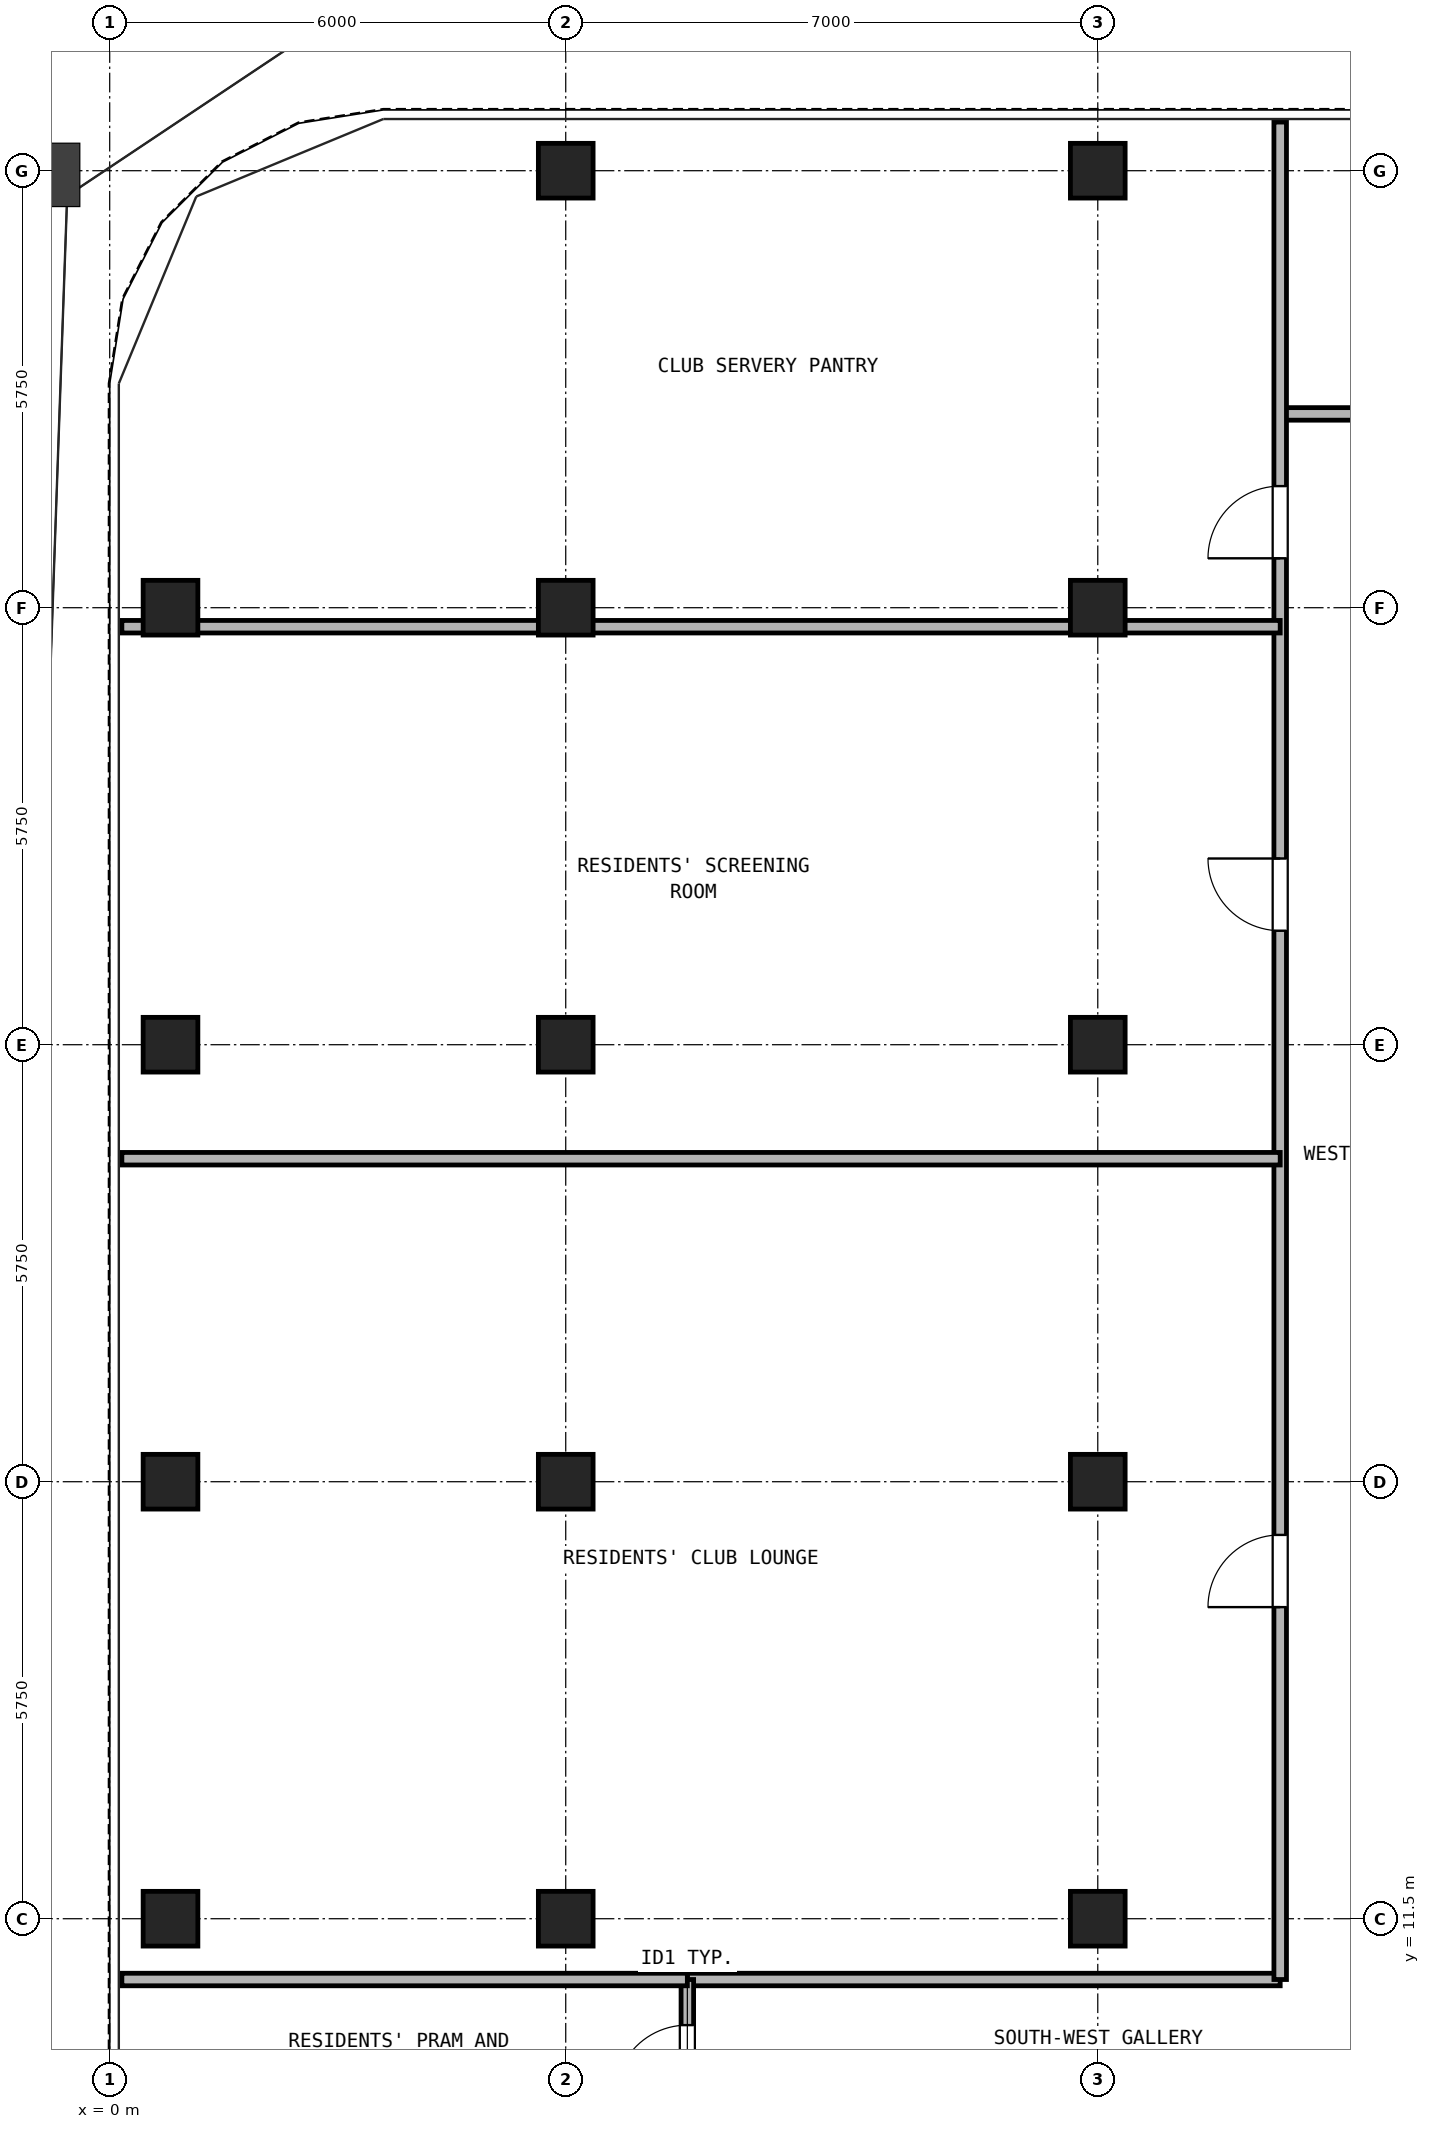
"""IFC4 building model, lengths in metres.
Left out: names, types, materials, properties, quantities, classifications, styles, units other than length and angle.
Written with IfcOpenShell. Run it as: python <this file> out.ifc"""

import sys

from ifc_helpers import new_model, si_unit, direction, frame, frame_2d, origin, origin_2d, place, context, subcontext, project, spatial, rectangle, hollow_rectangle, extrude, source, transform, mapped, element, fill, save


model = new_model("IFC4")
c1 = context("Model", 3, precision=1e-05, world=origin(), true_north=direction((0.0, 1.0)))
c2 = subcontext(c1, "Body", "Model", "MODEL_VIEW")
j1 = project(units=[si_unit("LENGTHUNIT", "METRE"), si_unit("PLANEANGLEUNIT", "RADIAN")], contexts=[c1])
p1 = place(None, origin())
s1 = spatial("IfcSite", under=j1, at=p1, CompositionType="ELEMENT")
p2 = place(p1, origin())
s2 = spatial("IfcBuilding", under=s1, at=p2, CompositionType="ELEMENT")
p3 = place(p2, frame((0.0, 0.0, 178.5)))
s3 = spatial("IfcBuildingStorey", under=s2, at=p3, CompositionType="ELEMENT", Elevation=178.5)
m1 = source(origin(), c2, "Body", "SweptSolid", [
    extrude(hollow_rectangle(XDim=0.72, YDim=0.72, WallThickness=0.04, at=origin_2d()), origin(), (0.0, 0.0, 1.0), 2.95),
])
for number, where, z_axis, x_axis in (
    (1, (6.0, 34.5, 0.0), (0.0, 0.0, 1.0), (1.0, 0.0, 0.0)),
    (2, (13.0, 34.5, 0.0), (0.0, 0.0, 1.0), (1.0, 0.0, 0.0)),
    (3, (0.8, 11.5, 0.0), (0.0, 0.0, 1.0), (1.0, 0.0, 0.0)),
    (4, (0.8, 17.25, 0.0), (0.0, 0.0, 1.0), (1.0, 0.0, 0.0)),
    (5, (0.8, 23.0, 0.0), (0.0, 0.0, 1.0), (1.0, 0.0, 0.0)),
    (6, (0.8, 28.75, 0.0), (0.0, 0.0, 1.0), (1.0, 0.0, 0.0)),
    (7, (6.0, 11.5, 0.0), (0.0, 0.0, 1.0), (1.0, 0.0, 0.0)),
    (8, (6.0, 17.25, 0.0), (0.0, 0.0, 1.0), (1.0, 0.0, 0.0)),
    (9, (6.0, 23.0, 0.0), (0.0, 0.0, 1.0), (1.0, 0.0, 0.0)),
    (10, (6.0, 28.75, 0.0), (0.0, 0.0, 1.0), (1.0, 0.0, 0.0)),
    (11, (13.0, 11.5, 0.0), (0.0, 0.0, 1.0), (1.0, 0.0, 0.0)),
    (12, (13.0, 17.25, 0.0), (0.0, 0.0, 1.0), (1.0, 0.0, 0.0)),
    (13, (13.0, 23.0, 0.0), (0.0, 0.0, 1.0), (1.0, 0.0, 0.0)),
    (14, (13.0, 28.75, 0.0), (0.0, 0.0, 1.0), (1.0, 0.0, 0.0)),
):
    element("IfcColumn", number, at=place(p3, frame(where, z_axis=z_axis, x_axis=x_axis)), inside=s3, PredefinedType="COLUMN", context=c2, shape_type="MappedRepresentation", body=[
        mapped(m1, transform((0.0, 0.0, 0.0), x_axis=(1.0, 0.0, 0.0), y_axis=(0.0, 1.0, 0.0), z_axis=(0.0, 0.0, 1.0), scale=1.0)),
    ])
p4 = place(p3, frame((7.6, 10.7, 0.0), z_axis=(0.0, 0.0, 1.0), x_axis=(1.0, 0.0, 0.0)))
e15 = element("IfcWall", 15, at=p4, inside=s3, PredefinedType="PARTITIONING", context=c2, shape_type="SweptSolid", body=[
    extrude(rectangle(XDim=7.8, YDim=0.165, at=frame_2d((3.9, 0.0))), origin(), (0.0, 0.0, 1.0), 2.95),
])
p5 = place(p3, frame((7.6, 8.7, 0.0), z_axis=(0.0, 0.0, 1.0), x_axis=(0.0, 1.0, 0.0)))
e16 = element("IfcWall", 16, at=p5, inside=s3, PredefinedType="PARTITIONING", context=c2, shape_type="SweptSolid", body=[
    extrude(rectangle(XDim=2.0, YDim=0.165, at=frame_2d((1.0, 0.0))), origin(), (0.0, 0.0, 1.0), 2.95),
])
p6 = place(p5, frame((0.45, 0.0, 0.0)))
e17 = element("IfcOpeningElement", 17, at=p6, cuts=e16, PredefinedType="OPENING", context=c2, shape_type="SweptSolid", body=[
    extrude(rectangle(XDim=0.95, YDim=2.15, at=frame_2d((0.475, 1.075))), frame((0.0, 0.093, 0.0), z_axis=(0.0, -1.0, 0.0), x_axis=(1.0, 0.0, 0.0)), (0.0, 0.0, 1.0), 0.185),
])
p7 = place(p3, frame((15.4, 31.3, 0.0), z_axis=(0.0, 0.0, 1.0), x_axis=(1.0, 0.0, 0.0)))
e18 = element("IfcWall", 18, at=p7, inside=s3, PredefinedType="PARTITIONING", context=c2, shape_type="SweptSolid", body=[
    extrude(rectangle(XDim=16.2, YDim=0.165, at=frame_2d((8.1, 0.0))), origin(), (0.0, 0.0, 1.0), 2.95),
])
p8 = place(p7, frame((2.8, 0.0, 0.0)))
e19 = element("IfcOpeningElement", 19, at=p8, cuts=e18, PredefinedType="OPENING", context=c2, shape_type="SweptSolid", body=[
    extrude(rectangle(XDim=0.95, YDim=2.15, at=frame_2d((0.475, 1.075))), frame((0.0, 0.093, 0.0), z_axis=(0.0, -1.0, 0.0), x_axis=(1.0, 0.0, 0.0)), (0.0, 0.0, 1.0), 0.185),
])
p9 = place(p7, frame((8.15, 0.0, 0.0)))
e20 = element("IfcOpeningElement", 20, at=p9, cuts=e18, PredefinedType="OPENING", context=c2, shape_type="SweptSolid", body=[
    extrude(rectangle(XDim=0.95, YDim=2.15, at=frame_2d((0.475, 1.075))), frame((0.0, 0.093, 0.0), z_axis=(0.0, -1.0, 0.0), x_axis=(1.0, 0.0, 0.0)), (0.0, 0.0, 1.0), 0.185),
])
p10 = place(p7, frame((12.95, 0.0, 0.0)))
e21 = element("IfcOpeningElement", 21, at=p10, cuts=e18, PredefinedType="OPENING", context=c2, shape_type="SweptSolid", body=[
    extrude(rectangle(XDim=0.92, YDim=2.1, at=frame_2d((0.46, 1.05))), frame((0.0, 0.093, 0.0), z_axis=(0.0, -1.0, 0.0), x_axis=(1.0, 0.0, 0.0)), (0.0, 0.0, 1.0), 0.185),
])
p11 = place(p3, frame((15.4, 10.7, 0.0), z_axis=(0.0, 0.0, 1.0), x_axis=(0.0, 1.0, 0.0)))
e22 = element("IfcWall", 22, at=p11, inside=s3, PredefinedType="PARTITIONING", context=c2, shape_type="SweptSolid", body=[
    extrude(rectangle(XDim=24.44, YDim=0.165, at=frame_2d((12.22, 0.0))), origin(), (0.0, 0.0, 1.0), 2.95),
])
p12 = place(p11, frame((4.9, 0.0, 0.0)))
e23 = element("IfcOpeningElement", 23, at=p12, cuts=e22, PredefinedType="OPENING", context=c2, shape_type="SweptSolid", body=[
    extrude(rectangle(XDim=0.95, YDim=2.15, at=frame_2d((0.475, 1.075))), frame((0.0, 0.093, 0.0), z_axis=(0.0, -1.0, 0.0), x_axis=(1.0, 0.0, 0.0)), (0.0, 0.0, 1.0), 0.185),
])
p13 = place(p11, frame((13.8, 0.0, 0.0)))
e24 = element("IfcOpeningElement", 24, at=p13, cuts=e22, PredefinedType="OPENING", context=c2, shape_type="SweptSolid", body=[
    extrude(rectangle(XDim=0.95, YDim=2.15, at=frame_2d((0.475, 1.075))), frame((0.0, 0.093, 0.0), z_axis=(0.0, -1.0, 0.0), x_axis=(1.0, 0.0, 0.0)), (0.0, 0.0, 1.0), 0.185),
])
p14 = place(p11, frame((18.7, 0.0, 0.0)))
e25 = element("IfcOpeningElement", 25, at=p14, cuts=e22, PredefinedType="OPENING", context=c2, shape_type="SweptSolid", body=[
    extrude(rectangle(XDim=0.95, YDim=2.15, at=frame_2d((0.475, 1.075))), frame((0.0, 0.093, 0.0), z_axis=(0.0, -1.0, 0.0), x_axis=(1.0, 0.0, 0.0)), (0.0, 0.0, 1.0), 0.185),
])
p15 = place(p3, frame((0.16, 10.7, 0.0), z_axis=(0.0, 0.0, 1.0), x_axis=(1.0, 0.0, 0.0)))
e26 = element("IfcWall", 26, at=p15, inside=s3, PredefinedType="PARTITIONING", context=c2, shape_type="SweptSolid", body=[
    extrude(rectangle(XDim=7.44, YDim=0.165, at=frame_2d((3.72, 0.0))), origin(), (0.0, 0.0, 1.0), 2.95),
])
p16 = place(p3, frame((0.16, 21.5, 0.0), z_axis=(0.0, 0.0, 1.0), x_axis=(1.0, 0.0, 0.0)))
e27 = element("IfcWall", 27, at=p16, inside=s3, PredefinedType="PARTITIONING", context=c2, shape_type="SweptSolid", body=[
    extrude(rectangle(XDim=15.24, YDim=0.165, at=frame_2d((7.62, 0.0))), origin(), (0.0, 0.0, 1.0), 2.95),
])
p17 = place(p3, frame((0.16, 28.5, 0.0), z_axis=(0.0, 0.0, 1.0), x_axis=(1.0, 0.0, 0.0)))
e28 = element("IfcWall", 28, at=p17, inside=s3, PredefinedType="PARTITIONING", context=c2, shape_type="SweptSolid", body=[
    extrude(rectangle(XDim=15.24, YDim=0.165, at=frame_2d((7.62, 0.0))), origin(), (0.0, 0.0, 1.0), 2.323),
])
p18 = place(p6, frame((0.95, 0.0, 0.0), z_axis=(0.0, 0.0, 1.0), x_axis=(-1.0, 0.0, 0.0)))
e29 = element("IfcDoor", 29, at=p18, inside=s3, OperationType="SINGLE_SWING_LEFT", PredefinedType="DOOR", context=c2, shape_type="SweptSolid", body=[
    extrude(rectangle(XDim=0.95, YDim=2.15, at=frame_2d((0.475, 1.075))), frame((0.0, 0.025, 0.0), z_axis=(0.0, -1.0, 0.0), x_axis=(1.0, 0.0, 0.0)), (0.0, 0.0, 1.0), 0.05),
])
fill(e17, e29)
p19 = place(p12, frame((0.95, 0.0, 0.0), z_axis=(0.0, 0.0, 1.0), x_axis=(-1.0, 0.0, 0.0)))
e30 = element("IfcDoor", 30, at=p19, inside=s3, OperationType="SINGLE_SWING_LEFT", PredefinedType="DOOR", context=c2, shape_type="SweptSolid", body=[
    extrude(rectangle(XDim=0.95, YDim=2.15, at=frame_2d((0.475, 1.075))), frame((0.0, 0.025, 0.0), z_axis=(0.0, -1.0, 0.0), x_axis=(1.0, 0.0, 0.0)), (0.0, 0.0, 1.0), 0.05),
])
fill(e23, e30)
p20 = place(p13, frame((0.95, 0.0, 0.0), z_axis=(0.0, 0.0, 1.0), x_axis=(-1.0, 0.0, 0.0)))
e31 = element("IfcDoor", 31, at=p20, inside=s3, OperationType="SINGLE_SWING_RIGHT", PredefinedType="DOOR", context=c2, shape_type="SweptSolid", body=[
    extrude(rectangle(XDim=0.95, YDim=2.15, at=frame_2d((0.475, 1.075))), frame((0.0, 0.025, 0.0), z_axis=(0.0, -1.0, 0.0), x_axis=(1.0, 0.0, 0.0)), (0.0, 0.0, 1.0), 0.05),
])
fill(e24, e31)
p21 = place(p14, frame((0.95, 0.0, 0.0), z_axis=(0.0, 0.0, 1.0), x_axis=(-1.0, 0.0, 0.0)))
e32 = element("IfcDoor", 32, at=p21, inside=s3, OperationType="SINGLE_SWING_LEFT", PredefinedType="DOOR", context=c2, shape_type="SweptSolid", body=[
    extrude(rectangle(XDim=0.95, YDim=2.15, at=frame_2d((0.475, 1.075))), frame((0.0, 0.025, 0.0), z_axis=(0.0, -1.0, 0.0), x_axis=(1.0, 0.0, 0.0)), (0.0, 0.0, 1.0), 0.05),
])
fill(e25, e32)
save(model, sys.argv[1])
